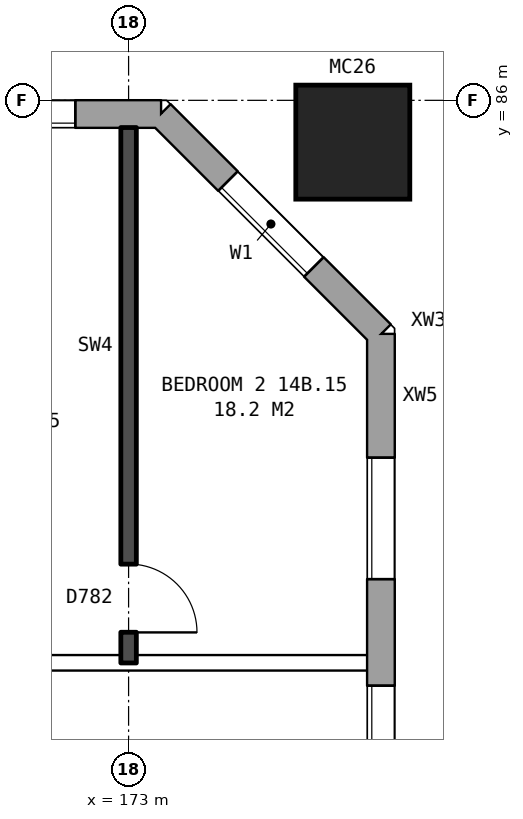
"""IFC4 building model, lengths in metres.
Left out: names, types, materials, properties, quantities, classifications, styles, units other than length and angle.
Written with IfcOpenShell. Run it as: python <this file> out.ifc"""

import sys

from ifc_helpers import new_model, si_unit, direction, frame, frame_2d, origin, origin_2d, place, context, subcontext, project, spatial, rectangle, hollow_rectangle, extrude, element, fill, save


model = new_model("IFC4")
c1 = context("Model", 3, precision=1e-05, world=origin(), true_north=direction((0.0, 1.0)))
c2 = subcontext(c1, "Body", "Model", "MODEL_VIEW")
j1 = project(units=[si_unit("LENGTHUNIT", "METRE"), si_unit("PLANEANGLEUNIT", "RADIAN")], contexts=[c1])
p1 = place(None, origin())
s1 = spatial("IfcSite", under=j1, at=p1, CompositionType="ELEMENT")
p2 = place(p1, origin())
s2 = spatial("IfcBuilding", under=s1, at=p2, CompositionType="ELEMENT")
p3 = place(p2, frame((0.0, 0.0, 53.6)))
s3 = spatial("IfcBuildingStorey", under=s2, at=p3, CompositionType="ELEMENT", Elevation=53.6)
p4 = place(p3, frame((175.95, 85.45, 0.0), z_axis=(0.0, 0.0, 1.0), x_axis=(1.0, 0.0, 0.0)))
e1 = element("IfcColumn", 1, at=p4, inside=s3, PredefinedType="COLUMN", context=c2, shape_type="SweptSolid", body=[
    extrude(hollow_rectangle(XDim=1.5, YDim=1.5, WallThickness=0.08, at=origin_2d()), origin(), (0.0, 0.0, 1.0), 3.1),
])
p5 = place(p3, frame((176.32, 57.075, 0.0), z_axis=(0.0, 0.0, 1.0), x_axis=(0.0, 1.0, 0.0)))
e2 = element("IfcWall", 2, at=p5, inside=s3, PredefinedType="STANDARD", context=c2, shape_type="SweptSolid", body=[
    extrude(rectangle(XDim=25.851, YDim=0.36, at=frame_2d((12.925, 0.0))), origin(), (0.0, 0.0, 1.0), 2.85),
])
p6 = place(p5, frame((1.625, 0.0, 0.8)))
e3 = element("IfcOpeningElement", 3, at=p6, cuts=e2, PredefinedType="OPENING", context=c2, shape_type="SweptSolid", body=[
    extrude(rectangle(XDim=1.6, YDim=1.8, at=frame_2d((0.8, 0.9))), frame((0.0, 0.19, 0.0), z_axis=(0.0, -1.0, 0.0), x_axis=(1.0, 0.0, 0.0)), (0.0, 0.0, 1.0), 0.38),
])
p7 = place(p5, frame((4.625, 0.0, 0.8)))
e4 = element("IfcOpeningElement", 4, at=p7, cuts=e2, PredefinedType="OPENING", context=c2, shape_type="SweptSolid", body=[
    extrude(rectangle(XDim=1.6, YDim=1.8, at=frame_2d((0.8, 0.9))), frame((0.0, 0.19, 0.0), z_axis=(0.0, -1.0, 0.0), x_axis=(1.0, 0.0, 0.0)), (0.0, 0.0, 1.0), 0.38),
])
p8 = place(p5, frame((6.525, 0.0, 0.8)))
e5 = element("IfcOpeningElement", 5, at=p8, cuts=e2, PredefinedType="OPENING", context=c2, shape_type="SweptSolid", body=[
    extrude(rectangle(XDim=1.0, YDim=1.8, at=frame_2d((0.5, 0.9))), frame((0.0, 0.19, 0.0), z_axis=(0.0, -1.0, 0.0), x_axis=(1.0, 0.0, 0.0)), (0.0, 0.0, 1.0), 0.38),
])
p9 = place(p5, frame((7.825, 0.0, 0.8)))
e6 = element("IfcOpeningElement", 6, at=p9, cuts=e2, PredefinedType="OPENING", context=c2, shape_type="SweptSolid", body=[
    extrude(rectangle(XDim=1.2, YDim=0.9, at=frame_2d((0.6, 0.45))), frame((0.0, 0.19, 0.0), z_axis=(0.0, -1.0, 0.0), x_axis=(1.0, 0.0, 0.0)), (0.0, 0.0, 1.0), 0.38),
])
p10 = place(p5, frame((10.275, 0.0, 1.7)))
e7 = element("IfcOpeningElement", 7, at=p10, cuts=e2, PredefinedType="OPENING", context=c2, shape_type="SweptSolid", body=[
    extrude(rectangle(XDim=0.8, YDim=0.9, at=frame_2d((0.4, 0.45))), frame((0.0, 0.19, 0.0), z_axis=(0.0, -1.0, 0.0), x_axis=(1.0, 0.0, 0.0)), (0.0, 0.0, 1.0), 0.38),
])
p11 = place(p5, frame((11.375, 0.0, 1.1)))
e8 = element("IfcOpeningElement", 8, at=p11, cuts=e2, PredefinedType="OPENING", context=c2, shape_type="SweptSolid", body=[
    extrude(rectangle(XDim=0.6, YDim=1.5, at=frame_2d((0.3, 0.75))), frame((0.0, 0.19, 0.0), z_axis=(0.0, -1.0, 0.0), x_axis=(1.0, 0.0, 0.0)), (0.0, 0.0, 1.0), 0.38),
])
p12 = place(p5, frame((19.625, 0.0, 0.8)))
e9 = element("IfcOpeningElement", 9, at=p12, cuts=e2, PredefinedType="OPENING", context=c2, shape_type="SweptSolid", body=[
    extrude(rectangle(XDim=1.6, YDim=1.8, at=frame_2d((0.8, 0.9))), frame((0.0, 0.19, 0.0), z_axis=(0.0, -1.0, 0.0), x_axis=(1.0, 0.0, 0.0)), (0.0, 0.0, 1.0), 0.38),
])
p13 = place(p5, frame((22.625, 0.0, 0.8)))
e10 = element("IfcOpeningElement", 10, at=p13, cuts=e2, PredefinedType="OPENING", context=c2, shape_type="SweptSolid", body=[
    extrude(rectangle(XDim=1.6, YDim=1.8, at=frame_2d((0.8, 0.9))), frame((0.0, 0.19, 0.0), z_axis=(0.0, -1.0, 0.0), x_axis=(1.0, 0.0, 0.0)), (0.0, 0.0, 1.0), 0.38),
])
p14 = place(p5, frame((12.275, 0.0, 0.8)))
e11 = element("IfcOpeningElement", 11, at=p14, cuts=e2, PredefinedType="OPENING", context=c2, shape_type="SweptSolid", body=[
    extrude(rectangle(XDim=1.6, YDim=1.8, at=frame_2d((0.8, 0.9))), frame((0.0, 0.19, 0.0), z_axis=(0.0, -1.0, 0.0), x_axis=(1.0, 0.0, 0.0)), (0.0, 0.0, 1.0), 0.38),
])
p15 = place(p5, frame((14.175, 0.0, 1.7)))
e12 = element("IfcOpeningElement", 12, at=p15, cuts=e2, PredefinedType="OPENING", context=c2, shape_type="SweptSolid", body=[
    extrude(rectangle(XDim=1.4, YDim=0.9, at=frame_2d((0.7, 0.45))), frame((0.0, 0.19, 0.0), z_axis=(0.0, -1.0, 0.0), x_axis=(1.0, 0.0, 0.0)), (0.0, 0.0, 1.0), 0.38),
])
p16 = place(p5, frame((16.725, 0.0, 0.8)))
e13 = element("IfcOpeningElement", 13, at=p16, cuts=e2, PredefinedType="OPENING", context=c2, shape_type="SweptSolid", body=[
    extrude(rectangle(XDim=1.2, YDim=0.9, at=frame_2d((0.6, 0.45))), frame((0.0, 0.19, 0.0), z_axis=(0.0, -1.0, 0.0), x_axis=(1.0, 0.0, 0.0)), (0.0, 0.0, 1.0), 0.38),
])
p17 = place(p5, frame((18.275, 0.0, 0.8)))
e14 = element("IfcOpeningElement", 14, at=p17, cuts=e2, PredefinedType="OPENING", context=c2, shape_type="SweptSolid", body=[
    extrude(rectangle(XDim=1.0, YDim=1.8, at=frame_2d((0.5, 0.9))), frame((0.0, 0.19, 0.0), z_axis=(0.0, -1.0, 0.0), x_axis=(1.0, 0.0, 0.0)), (0.0, 0.0, 1.0), 0.38),
])
p18 = place(p3, frame((176.32, 82.925, 0.0), z_axis=(0.0, 0.0, 1.0), x_axis=(-0.707106781187, 0.707106781187, 0.0)))
e15 = element("IfcWall", 15, at=p18, inside=s3, PredefinedType="STANDARD", context=c2, shape_type="SweptSolid", body=[
    extrude(rectangle(XDim=4.094, YDim=0.36, at=frame_2d((2.047, 0.0))), origin(), (0.0, 0.0, 1.0), 2.85),
])
p19 = place(p18, frame((1.247, 0.0, 0.8)))
e16 = element("IfcOpeningElement", 16, at=p19, cuts=e15, PredefinedType="OPENING", context=c2, shape_type="SweptSolid", body=[
    extrude(rectangle(XDim=1.6, YDim=1.8, at=frame_2d((0.8, 0.9))), frame((0.0, 0.19, 0.0), z_axis=(0.0, -1.0, 0.0), x_axis=(1.0, 0.0, 0.0)), (0.0, 0.0, 1.0), 0.38),
])
p20 = place(p3, frame((173.425, 85.82, 0.0), z_axis=(0.0, 0.0, 1.0), x_axis=(-1.0, 0.0, 0.0)))
e17 = element("IfcWall", 17, at=p20, inside=s3, PredefinedType="STANDARD", context=c2, shape_type="SweptSolid", body=[
    extrude(rectangle(XDim=39.351, YDim=0.36, at=frame_2d((19.675, 0.0))), origin(), (0.0, 0.0, 1.0), 2.85),
])
p21 = place(p20, frame((1.125, 0.0, 0.8)))
e18 = element("IfcOpeningElement", 18, at=p21, cuts=e17, PredefinedType="OPENING", context=c2, shape_type="SweptSolid", body=[
    extrude(rectangle(XDim=1.6, YDim=1.8, at=frame_2d((0.8, 0.9))), frame((0.0, 0.19, 0.0), z_axis=(0.0, -1.0, 0.0), x_axis=(1.0, 0.0, 0.0)), (0.0, 0.0, 1.0), 0.38),
])
p22 = place(p20, frame((4.125, 0.0, 0.8)))
e19 = element("IfcOpeningElement", 19, at=p22, cuts=e17, PredefinedType="OPENING", context=c2, shape_type="SweptSolid", body=[
    extrude(rectangle(XDim=1.6, YDim=1.8, at=frame_2d((0.8, 0.9))), frame((0.0, 0.19, 0.0), z_axis=(0.0, -1.0, 0.0), x_axis=(1.0, 0.0, 0.0)), (0.0, 0.0, 1.0), 0.38),
])
p23 = place(p20, frame((7.125, 0.0, 0.8)))
e20 = element("IfcOpeningElement", 20, at=p23, cuts=e17, PredefinedType="OPENING", context=c2, shape_type="SweptSolid", body=[
    extrude(rectangle(XDim=1.6, YDim=1.8, at=frame_2d((0.8, 0.9))), frame((0.0, 0.19, 0.0), z_axis=(0.0, -1.0, 0.0), x_axis=(1.0, 0.0, 0.0)), (0.0, 0.0, 1.0), 0.38),
])
p24 = place(p20, frame((9.625, 0.0, 1.65)))
e21 = element("IfcOpeningElement", 21, at=p24, cuts=e17, PredefinedType="OPENING", context=c2, shape_type="SweptSolid", body=[
    extrude(rectangle(XDim=0.6, YDim=0.9, at=frame_2d((0.3, 0.45))), frame((0.0, 0.19, 0.0), z_axis=(0.0, -1.0, 0.0), x_axis=(1.0, 0.0, 0.0)), (0.0, 0.0, 1.0), 0.38),
])
p25 = place(p20, frame((13.125, 0.0, 0.8)))
e22 = element("IfcOpeningElement", 22, at=p25, cuts=e17, PredefinedType="OPENING", context=c2, shape_type="SweptSolid", body=[
    extrude(rectangle(XDim=1.6, YDim=1.8, at=frame_2d((0.8, 0.9))), frame((0.0, 0.19, 0.0), z_axis=(0.0, -1.0, 0.0), x_axis=(1.0, 0.0, 0.0)), (0.0, 0.0, 1.0), 0.38),
])
p26 = place(p20, frame((16.125, 0.0, 0.8)))
e23 = element("IfcOpeningElement", 23, at=p26, cuts=e17, PredefinedType="OPENING", context=c2, shape_type="SweptSolid", body=[
    extrude(rectangle(XDim=1.6, YDim=1.8, at=frame_2d((0.8, 0.9))), frame((0.0, 0.19, 0.0), z_axis=(0.0, -1.0, 0.0), x_axis=(1.0, 0.0, 0.0)), (0.0, 0.0, 1.0), 0.38),
])
p27 = place(p20, frame((19.125, 0.0, 0.8)))
e24 = element("IfcOpeningElement", 24, at=p27, cuts=e17, PredefinedType="OPENING", context=c2, shape_type="SweptSolid", body=[
    extrude(rectangle(XDim=1.6, YDim=1.8, at=frame_2d((0.8, 0.9))), frame((0.0, 0.19, 0.0), z_axis=(0.0, -1.0, 0.0), x_axis=(1.0, 0.0, 0.0)), (0.0, 0.0, 1.0), 0.38),
])
p28 = place(p20, frame((22.125, 0.0, 0.8)))
e25 = element("IfcOpeningElement", 25, at=p28, cuts=e17, PredefinedType="OPENING", context=c2, shape_type="SweptSolid", body=[
    extrude(rectangle(XDim=1.6, YDim=1.8, at=frame_2d((0.8, 0.9))), frame((0.0, 0.19, 0.0), z_axis=(0.0, -1.0, 0.0), x_axis=(1.0, 0.0, 0.0)), (0.0, 0.0, 1.0), 0.38),
])
p29 = place(p20, frame((25.125, 0.0, 0.8)))
e26 = element("IfcOpeningElement", 26, at=p29, cuts=e17, PredefinedType="OPENING", context=c2, shape_type="SweptSolid", body=[
    extrude(rectangle(XDim=1.6, YDim=1.8, at=frame_2d((0.8, 0.9))), frame((0.0, 0.19, 0.0), z_axis=(0.0, -1.0, 0.0), x_axis=(1.0, 0.0, 0.0)), (0.0, 0.0, 1.0), 0.38),
])
p30 = place(p20, frame((27.575, 0.0, 0.15)))
e27 = element("IfcOpeningElement", 27, at=p30, cuts=e17, PredefinedType="OPENING", context=c2, shape_type="SweptSolid", body=[
    extrude(rectangle(XDim=1.0, YDim=0.9, at=frame_2d((0.5, 0.45))), frame((0.0, 0.19, 0.0), z_axis=(0.0, -1.0, 0.0), x_axis=(1.0, 0.0, 0.0)), (0.0, 0.0, 1.0), 0.38),
])
p31 = place(p20, frame((31.125, 0.0, 0.8)))
e28 = element("IfcOpeningElement", 28, at=p31, cuts=e17, PredefinedType="OPENING", context=c2, shape_type="SweptSolid", body=[
    extrude(rectangle(XDim=1.6, YDim=1.8, at=frame_2d((0.8, 0.9))), frame((0.0, 0.19, 0.0), z_axis=(0.0, -1.0, 0.0), x_axis=(1.0, 0.0, 0.0)), (0.0, 0.0, 1.0), 0.38),
])
p32 = place(p20, frame((34.125, 0.0, 0.8)))
e29 = element("IfcOpeningElement", 29, at=p32, cuts=e17, PredefinedType="OPENING", context=c2, shape_type="SweptSolid", body=[
    extrude(rectangle(XDim=1.6, YDim=1.8, at=frame_2d((0.8, 0.9))), frame((0.0, 0.19, 0.0), z_axis=(0.0, -1.0, 0.0), x_axis=(1.0, 0.0, 0.0)), (0.0, 0.0, 1.0), 0.38),
])
p33 = place(p20, frame((37.125, 0.0, 0.8)))
e30 = element("IfcOpeningElement", 30, at=p33, cuts=e17, PredefinedType="OPENING", context=c2, shape_type="SweptSolid", body=[
    extrude(rectangle(XDim=1.6, YDim=1.8, at=frame_2d((0.8, 0.9))), frame((0.0, 0.19, 0.0), z_axis=(0.0, -1.0, 0.0), x_axis=(1.0, 0.0, 0.0)), (0.0, 0.0, 1.0), 0.38),
])
p34 = place(p20, frame((10.975, 0.0, 0.35)))
e31 = element("IfcOpeningElement", 31, at=p34, cuts=e17, PredefinedType="OPENING", context=c2, shape_type="SweptSolid", body=[
    extrude(rectangle(XDim=1.2, YDim=0.9, at=frame_2d((0.6, 0.45))), frame((0.0, 0.19, 0.0), z_axis=(0.0, -1.0, 0.0), x_axis=(1.0, 0.0, 0.0)), (0.0, 0.0, 1.0), 0.38),
])
p35 = place(p20, frame((29.125, 0.0, 1.65)))
e32 = element("IfcOpeningElement", 32, at=p35, cuts=e17, PredefinedType="OPENING", context=c2, shape_type="SweptSolid", body=[
    extrude(rectangle(XDim=1.0, YDim=0.9, at=frame_2d((0.5, 0.45))), frame((0.0, 0.19, 0.0), z_axis=(0.0, -1.0, 0.0), x_axis=(1.0, 0.0, 0.0)), (0.0, 0.0, 1.0), 0.38),
])
p36 = place(p3, frame((155.1, 78.6, 0.0), z_axis=(0.0, 0.0, 1.0), x_axis=(1.0, 0.0, 0.0)))
e33 = element("IfcWall", 33, at=p36, inside=s3, PredefinedType="PARTITIONING", context=c2, shape_type="SweptSolid", body=[
    extrude(rectangle(XDim=21.04, YDim=0.2, at=frame_2d((10.52, 0.0))), origin(), (0.0, 0.0, 1.0), 2.85),
])
p37 = place(p36, frame((2.45, 0.0, 0.0)))
e34 = element("IfcOpeningElement", 34, at=p37, cuts=e33, PredefinedType="OPENING", context=c2, shape_type="SweptSolid", body=[
    extrude(rectangle(XDim=1.0, YDim=2.1, at=frame_2d((0.5, 1.05))), frame((0.0, 0.11, 0.0), z_axis=(0.0, -1.0, 0.0), x_axis=(1.0, 0.0, 0.0)), (0.0, 0.0, 1.0), 0.22),
])
p38 = place(p36, frame((14.4, 0.0, 0.0)))
e35 = element("IfcOpeningElement", 35, at=p38, cuts=e33, PredefinedType="OPENING", context=c2, shape_type="SweptSolid", body=[
    extrude(rectangle(XDim=1.0, YDim=2.1, at=frame_2d((0.5, 1.05))), frame((0.0, 0.11, 0.0), z_axis=(0.0, -1.0, 0.0), x_axis=(1.0, 0.0, 0.0)), (0.0, 0.0, 1.0), 0.22),
])
p39 = place(p3, frame((173.0, 78.6, 0.0), z_axis=(0.0, 0.0, 1.0), x_axis=(0.0, 1.0, 0.0)))
e36 = element("IfcWall", 36, at=p39, inside=s3, PredefinedType="SOLIDWALL", context=c2, shape_type="SweptSolid", body=[
    extrude(rectangle(XDim=7.04, YDim=0.2, at=frame_2d((3.52, 0.0))), origin(), (0.0, 0.0, 1.0), 2.85),
])
p40 = place(p39, frame((0.4, 0.0, 0.0)))
e37 = element("IfcOpeningElement", 37, at=p40, cuts=e36, PredefinedType="OPENING", context=c2, shape_type="SweptSolid", body=[
    extrude(rectangle(XDim=0.9, YDim=2.1, at=frame_2d((0.45, 1.05))), frame((0.0, 0.11, 0.0), z_axis=(0.0, -1.0, 0.0), x_axis=(1.0, 0.0, 0.0)), (0.0, 0.0, 1.0), 0.22),
])
p41 = place(p12, origin())
e38 = element("IfcWindow", 38, at=p41, inside=s3, PartitioningType="SINGLE_PANEL", PredefinedType="WINDOW", context=c2, shape_type="SweptSolid", body=[
    extrude(rectangle(XDim=1.6, YDim=1.8, at=frame_2d((0.8, 0.9))), frame((0.0, 0.15, 0.0), z_axis=(0.0, -1.0, 0.0), x_axis=(1.0, 0.0, 0.0)), (0.0, 0.0, 1.0), 0.06),
])
fill(e9, e38)
p42 = place(p13, origin())
e39 = element("IfcWindow", 39, at=p42, inside=s3, PartitioningType="SINGLE_PANEL", PredefinedType="WINDOW", context=c2, shape_type="SweptSolid", body=[
    extrude(rectangle(XDim=1.6, YDim=1.8, at=frame_2d((0.8, 0.9))), frame((0.0, 0.15, 0.0), z_axis=(0.0, -1.0, 0.0), x_axis=(1.0, 0.0, 0.0)), (0.0, 0.0, 1.0), 0.06),
])
fill(e10, e39)
p43 = place(p19, origin())
e40 = element("IfcWindow", 40, at=p43, inside=s3, PartitioningType="SINGLE_PANEL", PredefinedType="WINDOW", context=c2, shape_type="SweptSolid", body=[
    extrude(rectangle(XDim=1.6, YDim=1.8, at=frame_2d((0.8, 0.9))), frame((0.0, 0.15, 0.0), z_axis=(0.0, -1.0, 0.0), x_axis=(1.0, 0.0, 0.0)), (0.0, 0.0, 1.0), 0.06),
])
fill(e16, e40)
p44 = place(p21, origin())
e41 = element("IfcWindow", 41, at=p44, inside=s3, PartitioningType="SINGLE_PANEL", PredefinedType="WINDOW", context=c2, shape_type="SweptSolid", body=[
    extrude(rectangle(XDim=1.6, YDim=1.8, at=frame_2d((0.8, 0.9))), frame((0.0, 0.15, 0.0), z_axis=(0.0, -1.0, 0.0), x_axis=(1.0, 0.0, 0.0)), (0.0, 0.0, 1.0), 0.06),
])
fill(e18, e41)
p45 = place(p40, frame((0.9, 0.0, 0.0), z_axis=(0.0, 0.0, 1.0), x_axis=(-1.0, 0.0, 0.0)))
e42 = element("IfcDoor", 42, at=p45, inside=s3, OperationType="SINGLE_SWING_RIGHT", PredefinedType="DOOR", context=c2, shape_type="SweptSolid", body=[
    extrude(rectangle(XDim=0.9, YDim=2.1, at=frame_2d((0.45, 1.05))), frame((0.0, 0.025, 0.0), z_axis=(0.0, -1.0, 0.0), x_axis=(1.0, 0.0, 0.0)), (0.0, 0.0, 1.0), 0.05),
])
fill(e37, e42)
save(model, sys.argv[1])
